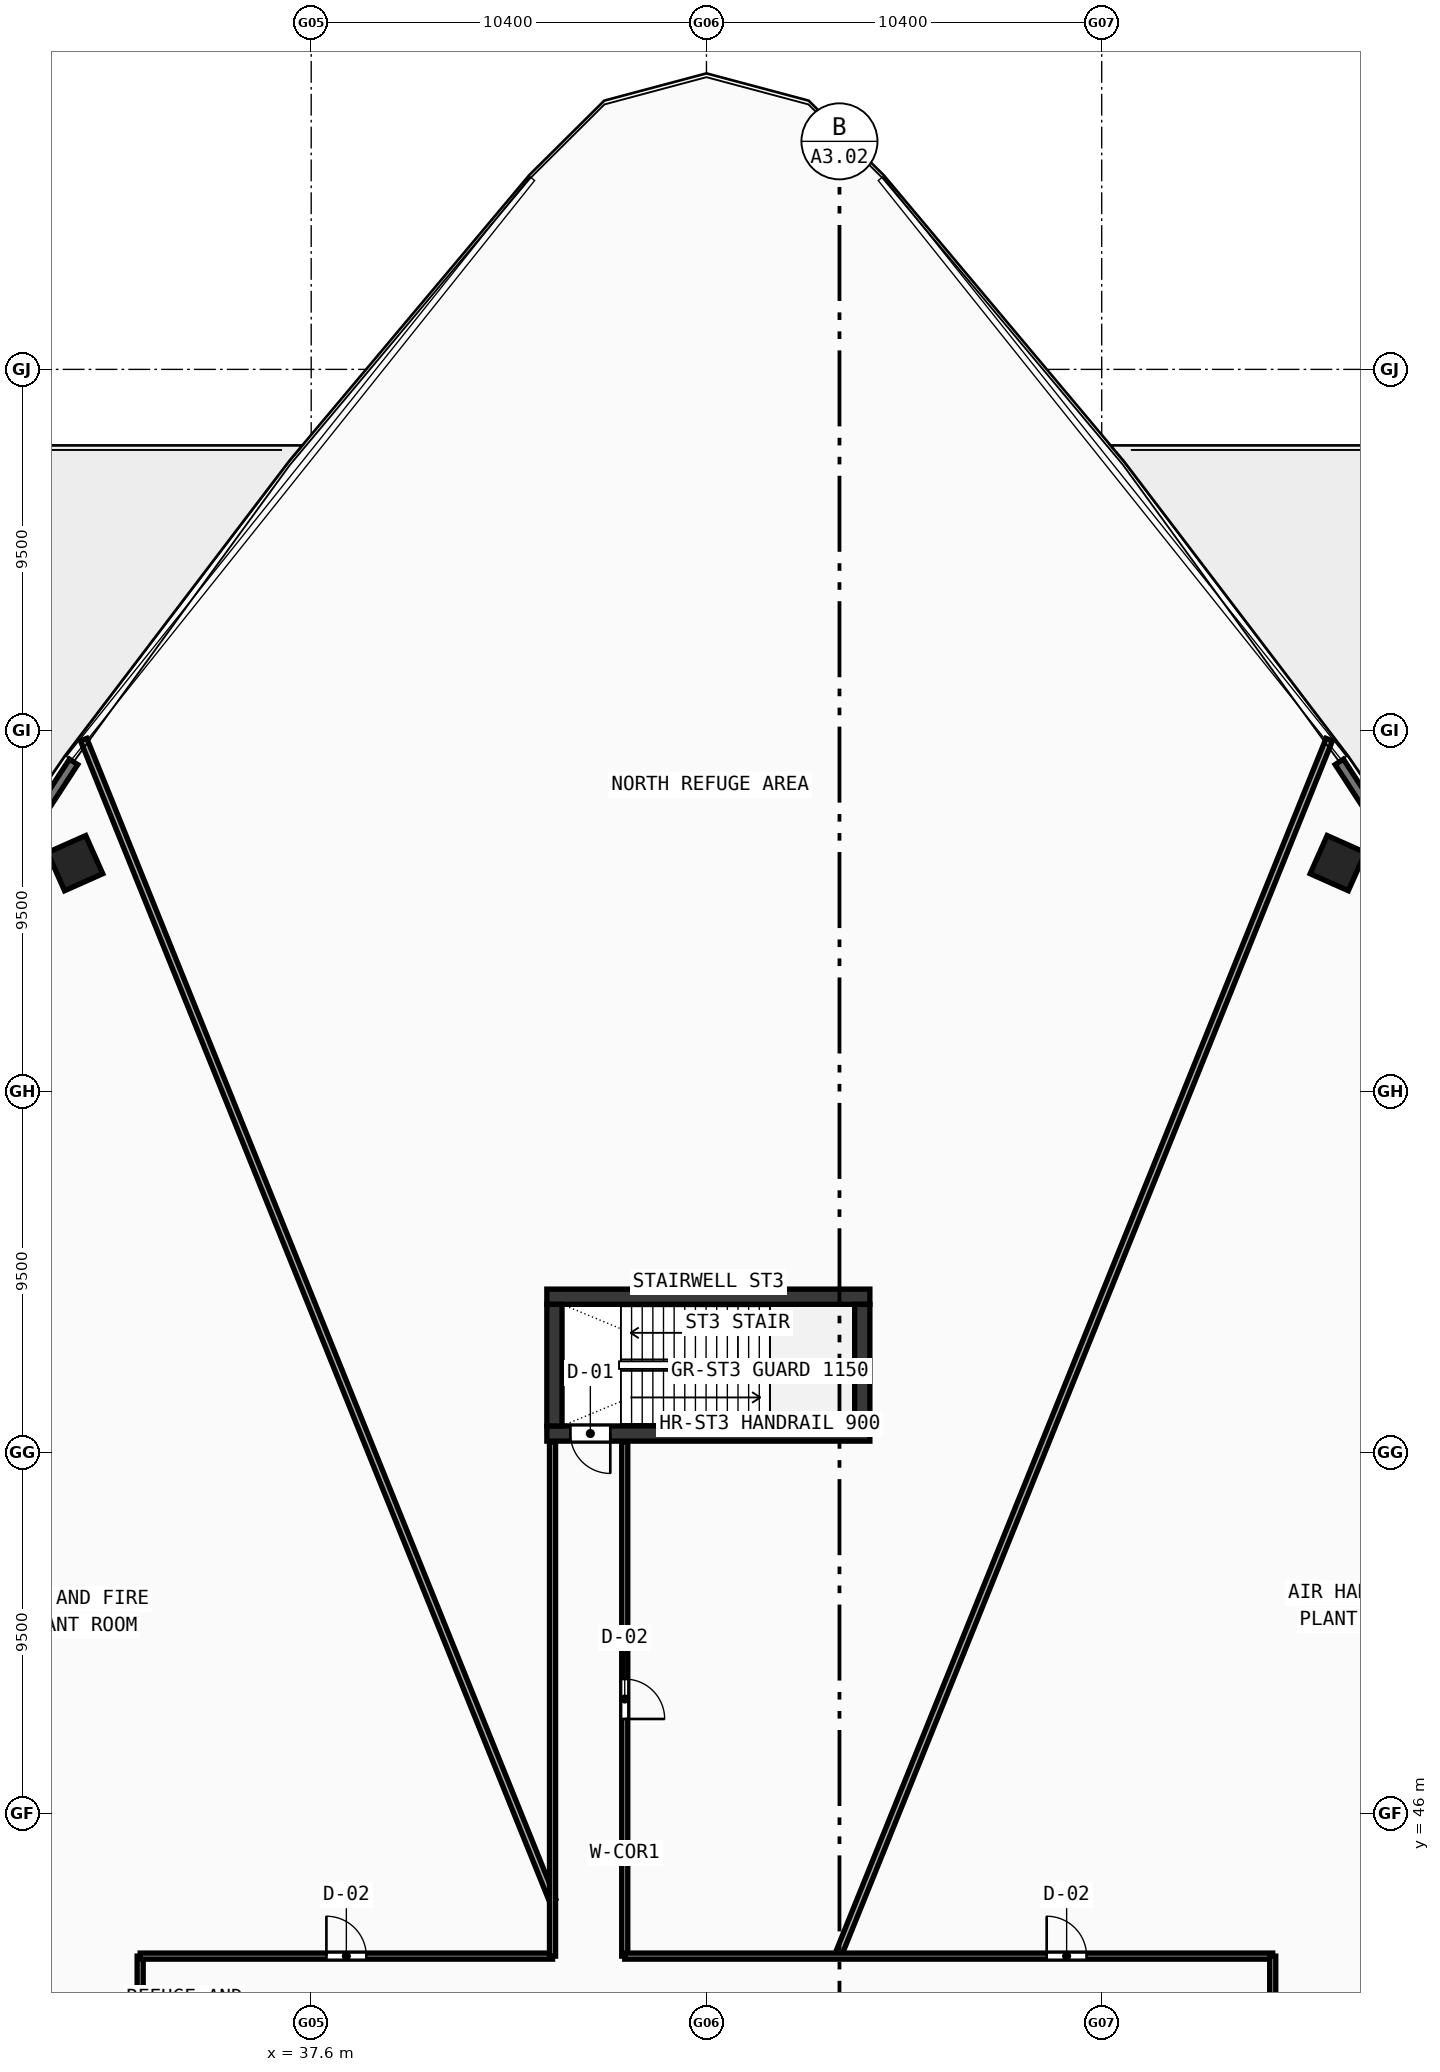
"""IFC4 building model, lengths in metres.
Left out: names, types, materials, properties, quantities, classifications, styles, units other than length and angle.
Written with IfcOpenShell. Run it as: python <this file> out.ifc"""

import sys

from ifc_helpers import new_model, si_unit, direction, frame, frame_2d, origin, origin_with_axes, origin_2d, place, context, subcontext, project, spatial, rectangle, hollow_rectangle, extrude, source, transform, mapped, element, fill, save


model = new_model("IFC4")
c1 = context("Model", 3, precision=1e-05, world=origin(), true_north=direction((0.0, 1.0)))
c2 = subcontext(c1, "Body", "Model", "MODEL_VIEW")
j1 = project(units=[si_unit("LENGTHUNIT", "METRE"), si_unit("PLANEANGLEUNIT", "RADIAN")], contexts=[c1])
p1 = place(None, origin())
s1 = spatial("IfcSite", under=j1, at=p1, CompositionType="ELEMENT")
p2 = place(p1, origin())
s2 = spatial("IfcBuilding", under=s1, at=p2, CompositionType="ELEMENT")
p3 = place(p2, frame((0.0, 0.0, 25.4)))
s3 = spatial("IfcBuildingStorey", under=s2, at=p3, CompositionType="ELEMENT", Elevation=25.4)
p4 = place(p3, frame((43.8, 59.6, 0.0), z_axis=(0.0, 0.0, 1.0), x_axis=(1.0, 0.0, 0.0)))
e1 = element("IfcWall", 1, at=p4, inside=s3, PredefinedType="SHEAR", context=c2, shape_type="SweptSolid", body=[
    extrude(rectangle(XDim=8.5, YDim=0.4, at=frame_2d((4.25, 0.0))), origin(), (0.0, 0.0, 1.0), 4.74),
])
p5 = place(p3, frame((43.8, 56.0, 0.0), z_axis=(0.0, 0.0, 1.0), x_axis=(1.0, 0.0, 0.0)))
e2 = element("IfcWall", 2, at=p5, inside=s3, PredefinedType="SHEAR", context=c2, shape_type="SweptSolid", body=[
    extrude(rectangle(XDim=8.5, YDim=0.4, at=frame_2d((4.25, 0.0))), origin(), (0.0, 0.0, 1.0), 4.74),
])
p6 = place(p5, frame((0.62, 0.0, 0.0)))
e3 = element("IfcOpeningElement", 3, at=p6, cuts=e2, PredefinedType="OPENING", context=c2, shape_type="SweptSolid", body=[
    extrude(rectangle(XDim=1.05, YDim=2.1, at=frame_2d((0.525, 1.05))), frame((0.0, 0.21, 0.0), z_axis=(0.0, -1.0, 0.0), x_axis=(1.0, 0.0, 0.0)), (0.0, 0.0, 1.0), 0.42),
])
for number, where, z_axis, x_axis in (
    (4, (44.0, 56.2, 0.0), (0.0, 0.0, 1.0), (0.0, 1.0, 0.0)),
    (5, (52.1, 56.2, 0.0), (0.0, 0.0, 1.0), (0.0, 1.0, 0.0)),
):
    element("IfcWall", number, at=place(p3, frame(where, z_axis=z_axis, x_axis=x_axis)), inside=s3, PredefinedType="SHEAR", context=c2, shape_type="SweptSolid", body=[
        extrude(rectangle(XDim=3.2, YDim=0.4, at=frame_2d((1.6, 0.0))), origin(), (0.0, 0.0, 1.0), 4.74),
    ])
m1 = source(origin(), c2, "Body", "SweptSolid", [
    extrude(hollow_rectangle(XDim=1.1, YDim=1.1, WallThickness=0.045, at=origin_2d()), origin(), (0.0, 0.0, 1.0), 5.02),
])
for number, where, z_axis, x_axis in (
    (6, (64.611, 71.009, -0.28), (0.0, 0.0, 1.0), (-0.914, 0.407, 0.0)),
    (7, (31.389, 71.009, -0.28), (0.0, 0.0, 1.0), (-0.914, -0.407, 0.0)),
):
    element("IfcColumn", number, at=place(p3, frame(where, z_axis=z_axis, x_axis=x_axis)), inside=s3, PredefinedType="COLUMN", context=c2, shape_type="MappedRepresentation", body=[
        mapped(m1, transform((0.0, 0.0, 0.0), scale=1.0)),
    ])
p7 = place(p3, frame((75.233, 57.429, 0.0), z_axis=(0.0, 0.0, 1.0), x_axis=(-0.54584859594, 0.837883828648, 0.0)))
e8 = element("IfcWall", 8, at=p7, inside=s3, PredefinedType="STANDARD", context=c2, shape_type="SweptSolid", body=[
    extrude(rectangle(XDim=19.386, YDim=0.26, at=frame_2d((9.693, 0.0))), origin(), (0.0, 0.0, 1.0), 4.24),
])
p8 = place(p7, frame((14.986, 0.0, 0.0)))
e9 = element("IfcOpeningElement", 9, at=p8, cuts=e8, PredefinedType="OPENING", context=c2, shape_type="SweptSolid", body=[
    extrude(rectangle(XDim=1.9, YDim=2.2, at=frame_2d((0.95, 1.1))), frame((0.0, 0.14, 0.0), z_axis=(0.0, -1.0, 0.0), x_axis=(1.0, 0.0, 0.0)), (0.0, 0.0, 1.0), 0.28),
])
p9 = place(p3, frame((31.348, 73.673, 0.0), z_axis=(0.0, 0.0, 1.0), x_axis=(-0.54584859594, -0.837883828648, 0.0)))
e10 = element("IfcWall", 10, at=p9, inside=s3, PredefinedType="STANDARD", context=c2, shape_type="SweptSolid", body=[
    extrude(rectangle(XDim=19.386, YDim=0.26, at=frame_2d((9.693, 0.0))), origin(), (0.0, 0.0, 1.0), 4.24),
])
p10 = place(p9, frame((2.5, 0.0, 0.0)))
e11 = element("IfcOpeningElement", 11, at=p10, cuts=e10, PredefinedType="OPENING", context=c2, shape_type="SweptSolid", body=[
    extrude(rectangle(XDim=1.9, YDim=2.2, at=frame_2d((0.95, 1.1))), frame((0.0, 0.14, 0.0), z_axis=(0.0, -1.0, 0.0), x_axis=(1.0, 0.0, 0.0)), (0.0, 0.0, 1.0), 0.28),
])
p11 = place(p3, frame((51.454, 42.25, 0.0), z_axis=(0.0, 0.0, 1.0), x_axis=(0.37460745467, 0.927183506597, 0.0)))
e12 = element("IfcWall", 12, at=p11, inside=s3, PredefinedType="PARTITIONING", context=c2, shape_type="SweptSolid", body=[
    extrude(rectangle(XDim=34.522, YDim=0.18, at=frame_2d((17.261, 0.0))), origin(), (0.0, 0.0, 1.0), 4.04),
])
p12 = place(p3, frame((43.95, 43.724, 0.0), z_axis=(0.0, 0.0, 1.0), x_axis=(-0.374604375639, 0.927184750604, 0.0)))
e13 = element("IfcWall", 13, at=p12, inside=s3, PredefinedType="PARTITIONING", context=c2, shape_type="SweptSolid", body=[
    extrude(rectangle(XDim=32.932, YDim=0.18, at=frame_2d((16.466, 0.0))), origin(), (0.0, 0.0, 1.0), 4.04),
])
p13 = place(p3, frame((45.85, 55.78, 0.0), z_axis=(0.0, 0.0, 1.0), x_axis=(0.0, -1.0, 0.0)))
e14 = element("IfcWall", 14, at=p13, inside=s3, PredefinedType="PARTITIONING", context=c2, shape_type="SweptSolid", body=[
    extrude(rectangle(XDim=13.53, YDim=0.16, at=frame_2d((6.765, 0.0))), origin(), (0.0, 0.0, 1.0), 4.34),
])
p14 = place(p13, frame((6.24, 0.0, 0.0)))
e15 = element("IfcOpeningElement", 15, at=p14, cuts=e14, PredefinedType="OPENING", context=c2, shape_type="SweptSolid", body=[
    extrude(rectangle(XDim=1.05, YDim=2.1, at=frame_2d((0.525, 1.05))), frame((0.0, 0.09, 0.0), z_axis=(0.0, -1.0, 0.0), x_axis=(1.0, 0.0, 0.0)), (0.0, 0.0, 1.0), 0.18),
])
p15 = place(p3, frame((45.85, 42.25, 0.0), z_axis=(0.0, 0.0, 1.0), x_axis=(1.0, 0.0, 0.0)))
e16 = element("IfcWall", 16, at=p15, inside=s3, PredefinedType="PARTITIONING", context=c2, shape_type="SweptSolid", body=[
    extrude(rectangle(XDim=17.05, YDim=0.16, at=frame_2d((8.525, 0.0))), origin(), (0.0, 0.0, 1.0), 4.04),
])
p16 = place(p15, frame((11.102, 0.0, 0.0)))
e17 = element("IfcOpeningElement", 17, at=p16, cuts=e16, PredefinedType="OPENING", context=c2, shape_type="SweptSolid", body=[
    extrude(rectangle(XDim=1.05, YDim=2.1, at=frame_2d((0.525, 1.05))), frame((0.0, 0.09, 0.0), z_axis=(0.0, -1.0, 0.0), x_axis=(1.0, 0.0, 0.0)), (0.0, 0.0, 1.0), 0.18),
])
p17 = place(p3, frame((62.9, 42.25, 0.0), z_axis=(0.0, 0.0, 1.0), x_axis=(0.0, -1.0, 0.0)))
e18 = element("IfcWall", 18, at=p17, inside=s3, PredefinedType="PARTITIONING", context=c2, shape_type="SweptSolid", body=[
    extrude(rectangle(XDim=17.35, YDim=0.16, at=frame_2d((8.675, 0.0))), origin(), (0.0, 0.0, 1.0), 4.04),
])
p18 = place(p17, frame((11.942, 0.0, 0.0)))
e19 = element("IfcOpeningElement", 19, at=p18, cuts=e18, PredefinedType="OPENING", context=c2, shape_type="SweptSolid", body=[
    extrude(rectangle(XDim=1.05, YDim=2.1, at=frame_2d((0.525, 1.05))), frame((0.0, 0.09, 0.0), z_axis=(0.0, -1.0, 0.0), x_axis=(1.0, 0.0, 0.0)), (0.0, 0.0, 1.0), 0.18),
])
p19 = place(p3, frame((33.1, 24.9, 0.0), z_axis=(0.0, 0.0, 1.0), x_axis=(0.0, 1.0, 0.0)))
e20 = element("IfcWall", 20, at=p19, inside=s3, PredefinedType="PARTITIONING", context=c2, shape_type="SweptSolid", body=[
    extrude(rectangle(XDim=17.35, YDim=0.16, at=frame_2d((8.675, 0.0))), origin(), (0.0, 0.0, 1.0), 4.04),
])
p20 = place(p19, frame((4.358, 0.0, 0.0)))
e21 = element("IfcOpeningElement", 21, at=p20, cuts=e20, PredefinedType="OPENING", context=c2, shape_type="SweptSolid", body=[
    extrude(rectangle(XDim=1.05, YDim=2.1, at=frame_2d((0.525, 1.05))), frame((0.0, 0.09, 0.0), z_axis=(0.0, -1.0, 0.0), x_axis=(1.0, 0.0, 0.0)), (0.0, 0.0, 1.0), 0.18),
])
p21 = place(p3, frame((33.1, 42.25, 0.0), z_axis=(0.0, 0.0, 1.0), x_axis=(1.0, 0.0, 0.0)))
e22 = element("IfcWall", 22, at=p21, inside=s3, PredefinedType="PARTITIONING", context=c2, shape_type="SweptSolid", body=[
    extrude(rectangle(XDim=10.85, YDim=0.16, at=frame_2d((5.425, 0.0))), origin(), (0.0, 0.0, 1.0), 4.04),
])
p22 = place(p21, frame((4.9, 0.0, 0.0)))
e23 = element("IfcOpeningElement", 23, at=p22, cuts=e22, PredefinedType="OPENING", context=c2, shape_type="SweptSolid", body=[
    extrude(rectangle(XDim=1.05, YDim=2.1, at=frame_2d((0.525, 1.05))), frame((0.0, 0.09, 0.0), z_axis=(0.0, -1.0, 0.0), x_axis=(1.0, 0.0, 0.0)), (0.0, 0.0, 1.0), 0.18),
])
p23 = place(p3, frame((43.95, 42.25, 0.0), z_axis=(0.0, 0.0, 1.0), x_axis=(0.0, 1.0, 0.0)))
e24 = element("IfcWall", 24, at=p23, inside=s3, PredefinedType="PARTITIONING", context=c2, shape_type="SweptSolid", body=[
    extrude(rectangle(XDim=13.53, YDim=0.16, at=frame_2d((6.765, 0.0))), origin(), (0.0, 0.0, 1.0), 4.04),
])
m2 = source(origin(), c2, "Body", "SweptSolid", [
    extrude(rectangle(XDim=1.05, YDim=2.1, at=frame_2d((0.525, 1.05))), frame((0.0, 0.025, 0.0), z_axis=(0.0, -1.0, 0.0), x_axis=(1.0, 0.0, 0.0)), (0.0, 0.0, 1.0), 0.05),
])
p24 = place(p6, frame((1.05, 0.0, 0.0), z_axis=(0.0, 0.0, 1.0), x_axis=(-1.0, 0.0, 0.0)))
e25 = element("IfcDoor", 25, at=p24, inside=s3, OperationType="SINGLE_SWING_LEFT", PredefinedType="DOOR", context=c2, shape_type="MappedRepresentation", body=[
    mapped(m2, transform((0.0, 0.0, 0.0), scale=1.0)),
])
fill(e3, e25)
p25 = place(p16, origin_with_axes())
e26 = element("IfcDoor", 26, at=p25, inside=s3, OperationType="SINGLE_SWING_LEFT", PredefinedType="DOOR", context=c2, shape_type="MappedRepresentation", body=[
    mapped(m2, transform((0.0, 0.0, 0.0), scale=1.0)),
])
fill(e17, e26)
p26 = place(p14, origin_with_axes())
e27 = element("IfcDoor", 27, at=p26, inside=s3, OperationType="SINGLE_SWING_RIGHT", PredefinedType="DOOR", context=c2, shape_type="MappedRepresentation", body=[
    mapped(m2, transform((0.0, 0.0, 0.0), scale=1.0)),
])
fill(e15, e27)
p27 = place(p22, origin_with_axes())
e28 = element("IfcDoor", 28, at=p27, inside=s3, OperationType="SINGLE_SWING_LEFT", PredefinedType="DOOR", context=c2, shape_type="MappedRepresentation", body=[
    mapped(m2, transform((0.0, 0.0, 0.0), scale=1.0)),
])
fill(e23, e28)
save(model, sys.argv[1])
